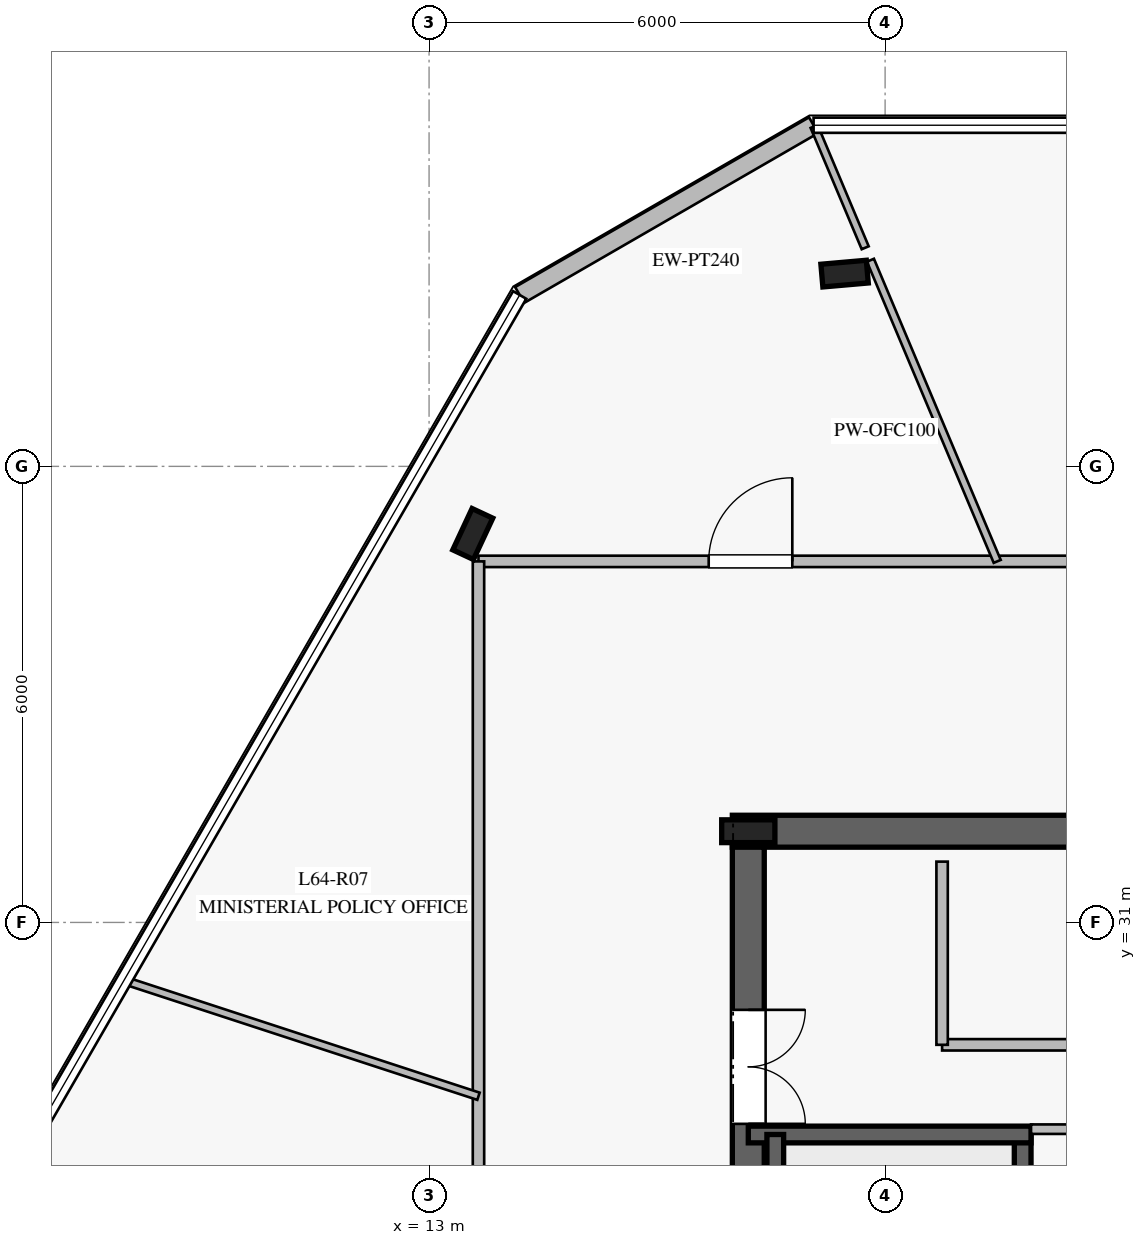
"""IFC4 building model, lengths in metres.
Left out: names, types, materials, properties, quantities, classifications, styles, units other than length and angle.
Written with IfcOpenShell. Run it as: python <this file> out.ifc"""

import sys

from ifc_helpers import new_model, si_unit, direction, frame, frame_2d, origin, origin_2d, place, context, subcontext, project, spatial, rectangle, i_section, extrude, element, fill, save


model = new_model("IFC4")
c1 = context("Model", 3, precision=1e-05, world=origin(), true_north=direction((0.0, 1.0)))
c2 = subcontext(c1, "Body", "Model", "MODEL_VIEW")
j1 = project(units=[si_unit("LENGTHUNIT", "METRE"), si_unit("PLANEANGLEUNIT", "RADIAN")], contexts=[c1])
p1 = place(None, origin())
s1 = spatial("IfcSite", under=j1, at=p1, CompositionType="ELEMENT")
p2 = place(p1, origin())
s2 = spatial("IfcBuilding", under=s1, at=p2, CompositionType="ELEMENT")
p3 = place(p2, frame((0.0, 0.0, 266.2)))
s3 = spatial("IfcBuildingStorey", under=s2, at=p3, CompositionType="ELEMENT", Elevation=266.2)
p4 = place(p3, frame((33.01, 32.2, 0.0), z_axis=(0.0, 0.0, 1.0), x_axis=(-1.0, 0.0, 0.0)))
e1 = element("IfcWall", 1, at=p4, inside=s3, PredefinedType="SHEAR", context=c2, shape_type="SweptSolid", body=[
    extrude(rectangle(XDim=16.02, YDim=0.42, at=frame_2d((8.01, 0.0))), origin(), (0.0, 0.0, 1.0), 3.78),
])
p5 = place(p4, frame((4.96, 0.0, 0.0)))
e2 = element("IfcOpeningElement", 2, at=p5, cuts=e1, PredefinedType="OPENING", context=c2, shape_type="SweptSolid", body=[
    extrude(rectangle(XDim=1.2, YDim=2.25, at=frame_2d((0.6, 1.125))), frame((0.0, 0.22, 0.0), z_axis=(0.0, -1.0, 0.0), x_axis=(1.0, 0.0, 0.0)), (0.0, 0.0, 1.0), 0.44),
])
p6 = place(p4, frame((9.785, 0.0, 0.0)))
e3 = element("IfcOpeningElement", 3, at=p6, cuts=e1, PredefinedType="OPENING", context=c2, shape_type="SweptSolid", body=[
    extrude(rectangle(XDim=1.1, YDim=2.2, at=frame_2d((0.55, 1.1))), frame((0.0, 0.22, 0.0), z_axis=(0.0, -1.0, 0.0), x_axis=(1.0, 0.0, 0.0)), (0.0, 0.0, 1.0), 0.44),
])
p7 = place(p3, frame((17.2, 31.99, 0.0), z_axis=(0.0, 0.0, 1.0), x_axis=(0.0, -1.0, 0.0)))
e4 = element("IfcWall", 4, at=p7, inside=s3, PredefinedType="SHEAR", context=c2, shape_type="SweptSolid", body=[
    extrude(rectangle(XDim=13.98, YDim=0.42, at=frame_2d((6.99, 0.0))), origin(), (0.0, 0.0, 1.0), 3.78),
])
p8 = place(p7, frame((2.14, 0.0, 0.0)))
e5 = element("IfcOpeningElement", 5, at=p8, cuts=e4, PredefinedType="OPENING", context=c2, shape_type="SweptSolid", body=[
    extrude(rectangle(XDim=1.5, YDim=2.2, at=frame_2d((0.75, 1.1))), frame((0.0, 0.22, 0.0), z_axis=(0.0, -1.0, 0.0), x_axis=(1.0, 0.0, 0.0)), (0.0, 0.0, 1.0), 0.44),
])
p9 = place(p3, frame((17.2, 32.2, 0.0), z_axis=(0.0, 0.0, 1.0), x_axis=(1.0, 0.0, 0.0)))
e6 = element("IfcColumn", 6, at=p9, inside=s3, PredefinedType="COLUMN", context=c2, shape_type="SweptSolid", body=[
    extrude(i_section(OverallWidth=0.3, OverallDepth=0.7, WebThickness=0.017, FlangeThickness=0.032, at=origin_2d()), origin(), (0.0, 0.0, 1.0), 4.0),
])
p10 = place(p3, frame((20.81, 20.99, 0.0), z_axis=(0.0, 0.0, 1.0), x_axis=(0.0, 1.0, 0.0)))
e7 = element("IfcWall", 7, at=p10, inside=s3, PredefinedType="SOLIDWALL", context=c2, shape_type="SweptSolid", body=[
    extrude(rectangle(XDim=7.22, YDim=0.22, at=frame_2d((3.61, 0.0))), origin(), (0.0, 0.0, 1.0), 3.78),
])
p11 = place(p10, frame((0.18, 0.0, 0.0)))
e8 = element("IfcOpeningElement", 8, at=p11, cuts=e7, PredefinedType="OPENING", context=c2, shape_type="SweptSolid", body=[
    extrude(rectangle(XDim=1.15, YDim=2.2, at=frame_2d((0.575, 1.1))), frame((0.0, 0.12, 0.0), z_axis=(0.0, -1.0, 0.0), x_axis=(1.0, 0.0, 0.0)), (0.0, 0.0, 1.0), 0.24),
])
p12 = place(p3, frame((17.2, 28.21, 0.0), z_axis=(0.0, 0.0, 1.0), x_axis=(1.0, 0.0, 0.0)))
e9 = element("IfcWall", 9, at=p12, inside=s3, PredefinedType="SOLIDWALL", context=c2, shape_type="SweptSolid", body=[
    extrude(rectangle(XDim=3.72, YDim=0.22, at=frame_2d((1.86, 0.0))), origin(), (0.0, 0.0, 1.0), 3.78),
])
p13 = place(p3, frame((17.555, 28.21, 0.0), z_axis=(0.0, 0.0, 1.0), x_axis=(0.0, -1.0, 0.0)))
e10 = element("IfcWall", 10, at=p13, inside=s3, PredefinedType="SOLIDWALL", context=c2, shape_type="SweptSolid", body=[
    extrude(rectangle(XDim=7.22, YDim=0.22, at=frame_2d((3.61, 0.0))), origin(), (0.0, 0.0, 1.0), 3.78),
])
for number, where, z_axis, x_axis in (
    (11, (18.467, 39.536, 0.0), (0.0, 0.0, 1.0), (0.996, 0.087, 0.0)),
    (12, (13.575, 36.11, 0.0), (0.0, 0.0, 1.0), (0.423, 0.906, 0.0)),
):
    element("IfcColumn", number, at=place(p3, frame(where, z_axis=z_axis, x_axis=x_axis)), inside=s3, PredefinedType="COLUMN", context=c2, shape_type="SweptSolid", body=[
        extrude(i_section(OverallWidth=0.3, OverallDepth=0.6, WebThickness=0.015, FlangeThickness=0.03, at=origin_2d()), origin(), (0.0, 0.0, 1.0), 4.0),
    ])
p14 = place(p3, frame((18.059, 41.488, 0.0), z_axis=(0.0, 0.0, 1.0), x_axis=(-0.865983458261, -0.500072644742, 0.0)))
e13 = element("IfcWall", 13, at=p14, inside=s3, PredefinedType="STANDARD", context=c2, shape_type="SweptSolid", body=[
    extrude(rectangle(XDim=4.466, YDim=0.24, at=frame_2d((2.233, 0.0))), origin(), (0.0, 0.0, 1.0), 3.78),
])
p15 = place(p3, frame((20.92, 28.28, 0.0), z_axis=(0.0, 0.0, 1.0), x_axis=(1.0, 0.0, 0.0)))
e14 = element("IfcWall", 14, at=p15, inside=s3, PredefinedType="PARTITIONING", context=c2, shape_type="SweptSolid", body=[
    extrude(rectangle(XDim=3.405, YDim=0.125, at=frame_2d((1.703, 0.0))), origin(), (0.0, 0.0, 1.0), 3.78),
])
p16 = place(p3, frame((19.75, 29.39, 0.0), z_axis=(0.0, 0.0, 1.0), x_axis=(1.0, 0.0, 0.0)))
e15 = element("IfcWall", 15, at=p16, inside=s3, PredefinedType="PARTITIONING", context=c2, shape_type="SweptSolid", body=[
    extrude(rectangle(XDim=5.9, YDim=0.15, at=frame_2d((2.95, 0.0))), origin(), (0.0, 0.0, 1.0), 3.78),
])
p17 = place(p3, frame((19.75, 29.39, 0.0), z_axis=(0.0, 0.0, 1.0), x_axis=(0.0, 1.0, 0.0)))
e16 = element("IfcWall", 16, at=p17, inside=s3, PredefinedType="PARTITIONING", context=c2, shape_type="SweptSolid", body=[
    extrude(rectangle(XDim=2.41, YDim=0.15, at=frame_2d((1.205, 0.0))), origin(), (0.0, 0.0, 1.0), 3.78),
])
p18 = place(p3, frame((13.65, 35.75, 0.0), z_axis=(0.0, 0.0, 1.0), x_axis=(1.0, 0.0, 0.0)))
e17 = element("IfcWall", 17, at=p18, inside=s3, PredefinedType="PARTITIONING", context=c2, shape_type="SweptSolid", body=[
    extrude(rectangle(XDim=22.7, YDim=0.15, at=frame_2d((11.35, 0.0))), origin(), (0.0, 0.0, 1.0), 3.05),
])
p19 = place(p18, frame((13.926, 0.0, 0.0)))
e18 = element("IfcOpeningElement", 18, at=p19, cuts=e17, PredefinedType="OPENING", context=c2, shape_type="SweptSolid", body=[
    extrude(rectangle(XDim=1.1, YDim=2.2, at=frame_2d((0.55, 1.1))), frame((0.0, 0.085, 0.0), z_axis=(0.0, -1.0, 0.0), x_axis=(1.0, 0.0, 0.0)), (0.0, 0.0, 1.0), 0.17),
])
p20 = place(p18, frame((3.029, 0.0, 0.0)))
e19 = element("IfcOpeningElement", 19, at=p20, cuts=e17, PredefinedType="OPENING", context=c2, shape_type="SweptSolid", body=[
    extrude(rectangle(XDim=1.1, YDim=2.2, at=frame_2d((0.55, 1.1))), frame((0.0, 0.085, 0.0), z_axis=(0.0, -1.0, 0.0), x_axis=(1.0, 0.0, 0.0)), (0.0, 0.0, 1.0), 0.17),
])
p21 = place(p3, frame((13.65, 14.25, 0.0), z_axis=(0.0, 0.0, 1.0), x_axis=(0.0, 1.0, 0.0)))
e20 = element("IfcWall", 20, at=p21, inside=s3, PredefinedType="PARTITIONING", context=c2, shape_type="SweptSolid", body=[
    extrude(rectangle(XDim=21.5, YDim=0.15, at=frame_2d((10.75, 0.0))), origin(), (0.0, 0.0, 1.0), 3.28),
])
p22 = place(p21, frame((6.935, 0.0, 0.0)))
e21 = element("IfcOpeningElement", 21, at=p22, cuts=e20, PredefinedType="OPENING", context=c2, shape_type="SweptSolid", body=[
    extrude(rectangle(XDim=1.1, YDim=2.2, at=frame_2d((0.55, 1.1))), frame((0.0, 0.085, 0.0), z_axis=(0.0, -1.0, 0.0), x_axis=(1.0, 0.0, 0.0)), (0.0, 0.0, 1.0), 0.17),
])
p23 = place(p3, frame((20.475, 35.75, 0.0), z_axis=(0.0, 0.0, 1.0), x_axis=(-0.38806461695, 0.921632167989, 0.0)))
e22 = element("IfcWall", 22, at=p23, inside=s3, PredefinedType="MOVABLE", context=c2, shape_type="SweptSolid", body=[
    extrude(rectangle(XDim=4.299, YDim=0.1, at=frame_2d((2.149, 0.0))), origin(), (0.0, 0.0, 1.0), 3.28),
])
p24 = place(p3, frame((18.738, 39.876, 0.0), z_axis=(0.0, 0.0, 1.0), x_axis=(-0.388126329447, 0.921606180746, 0.0)))
e23 = element("IfcWall", 23, at=p24, inside=s3, PredefinedType="MOVABLE", context=c2, shape_type="SweptSolid", body=[
    extrude(rectangle(XDim=1.732, YDim=0.1, at=frame_2d((0.866, 0.0))), origin(), (0.0, 0.0, 1.0), 3.78),
])
p25 = place(p3, frame((13.65, 28.713, 0.0), z_axis=(0.0, 0.0, 1.0), x_axis=(-0.950465262527, 0.310830797589, 0.0)))
e24 = element("IfcWall", 24, at=p25, inside=s3, PredefinedType="MOVABLE", context=c2, shape_type="SweptSolid", body=[
    extrude(rectangle(XDim=4.89, YDim=0.1, at=frame_2d((2.445, 0.0))), origin(), (0.0, 0.0, 1.0), 3.28),
])
p26 = place(p8, origin())
e25 = element("IfcDoor", 25, at=p26, inside=s3, OperationType="DOUBLE_DOOR_SINGLE_SWING", PredefinedType="DOOR", context=c2, shape_type="SweptSolid", body=[
    extrude(rectangle(XDim=1.5, YDim=2.2, at=frame_2d((0.75, 1.1))), frame((0.0, 0.025, 0.0), z_axis=(0.0, -1.0, 0.0), x_axis=(1.0, 0.0, 0.0)), (0.0, 0.0, 1.0), 0.05),
])
fill(e5, e25)
p27 = place(p20, origin())
e26 = element("IfcDoor", 26, at=p27, inside=s3, OperationType="SINGLE_SWING_RIGHT", PredefinedType="DOOR", context=c2, shape_type="SweptSolid", body=[
    extrude(rectangle(XDim=1.1, YDim=2.2, at=frame_2d((0.55, 1.1))), frame((0.0, 0.025, 0.0), z_axis=(0.0, -1.0, 0.0), x_axis=(1.0, 0.0, 0.0)), (0.0, 0.0, 1.0), 0.05),
])
fill(e19, e26)
save(model, sys.argv[1])
